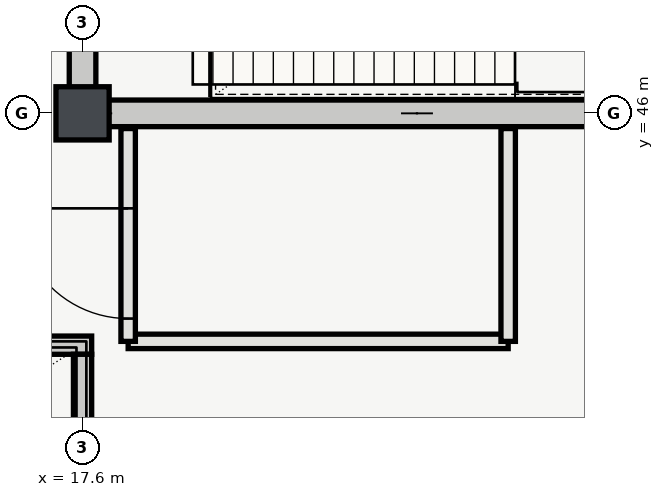
"""IFC4 building model, lengths in metres.
Left out: names, types, materials, properties, quantities, classifications, styles, units other than length and angle.
Written with IfcOpenShell. Run it as: python <this file> out.ifc"""

import sys

from ifc_helpers import new_model, si_unit, direction, frame, frame_2d, origin, origin_2d, place, context, subcontext, project, spatial, rectangle, extrude, element, fill, save


model = new_model("IFC4")
c1 = context("Model", 3, precision=1e-05, world=origin(), true_north=direction((0.0, 1.0)))
c2 = subcontext(c1, "Body", "Model", "MODEL_VIEW")
j1 = project(units=[si_unit("LENGTHUNIT", "METRE"), si_unit("PLANEANGLEUNIT", "RADIAN")], contexts=[c1])
p1 = place(None, origin())
s1 = spatial("IfcSite", under=j1, at=p1, CompositionType="ELEMENT")
p2 = place(p1, origin())
s2 = spatial("IfcBuilding", under=s1, at=p2, CompositionType="ELEMENT")
p3 = place(p2, frame((0.0, 0.0, 10.8)))
s3 = spatial("IfcBuildingStorey", under=s2, at=p3, CompositionType="ELEMENT", Elevation=10.8)
p4 = place(p3, frame((17.6, 46.0, 0.0), z_axis=(0.0, 0.0, 1.0), x_axis=(1.0, 0.0, 0.0)))
e1 = element("IfcColumn", 1, at=p4, inside=s3, PredefinedType="COLUMN", context=c2, shape_type="SweptSolid", body=[
    extrude(rectangle(XDim=0.7, YDim=0.7, at=origin_2d()), origin(), (0.0, 0.0, 1.0), 5.4),
])
p5 = place(p3, frame((17.425, 46.0, 0.0), z_axis=(0.0, 0.0, 1.0), x_axis=(1.0, 0.0, 0.0)))
e2 = element("IfcWall", 2, at=p5, inside=s3, PredefinedType="SHEAR", context=c2, shape_type="SweptSolid", body=[
    extrude(rectangle(XDim=9.15, YDim=0.35, at=frame_2d((4.575, 0.0))), origin(), (0.0, 0.0, 1.0), 5.12),
])
p6 = place(p3, frame((17.6, 46.175, 0.0), z_axis=(0.0, 0.0, 1.0), x_axis=(0.0, 1.0, 0.0)))
e3 = element("IfcWall", 3, at=p6, inside=s3, PredefinedType="SHEAR", context=c2, shape_type="SweptSolid", body=[
    extrude(rectangle(XDim=7.65, YDim=0.35, at=frame_2d((3.825, 0.0))), origin(), (0.0, 0.0, 1.0), 5.12),
])
p7 = place(p6, frame((1.65, 0.0, 0.0)))
e4 = element("IfcOpeningElement", 4, at=p7, cuts=e3, PredefinedType="OPENING", context=c2, shape_type="SweptSolid", body=[
    extrude(rectangle(XDim=1.35, YDim=2.2, at=frame_2d((0.675, 1.1))), frame((0.0, 0.185, 0.0), z_axis=(0.0, -1.0, 0.0), x_axis=(1.0, 0.0, 0.0)), (0.0, 0.0, 1.0), 0.37),
])
p8 = place(p3, frame((18.2, 43.0, 0.0), z_axis=(0.0, 0.0, 1.0), x_axis=(1.0, 0.0, 0.0)))
e5 = element("IfcWall", 5, at=p8, inside=s3, PredefinedType="PARTITIONING", context=c2, shape_type="SweptSolid", body=[
    extrude(rectangle(XDim=5.0, YDim=0.19, at=frame_2d((2.5, 0.0))), origin(), (0.0, 0.0, 1.0), 5.12),
])
p9 = place(p3, frame((18.2, 45.8, 0.0), z_axis=(0.0, 0.0, 1.0), x_axis=(0.0, -1.0, 0.0)))
e6 = element("IfcWall", 6, at=p9, inside=s3, PredefinedType="PARTITIONING", context=c2, shape_type="SweptSolid", body=[
    extrude(rectangle(XDim=2.8, YDim=0.19, at=frame_2d((1.4, 0.0))), origin(), (0.0, 0.0, 1.0), 5.12),
])
p10 = place(p9, frame((1.05, 0.0, 0.0)))
e7 = element("IfcOpeningElement", 7, at=p10, cuts=e6, PredefinedType="OPENING", context=c2, shape_type="SweptSolid", body=[
    extrude(rectangle(XDim=1.45, YDim=2.2, at=frame_2d((0.725, 1.1))), frame((0.0, 0.105, 0.0), z_axis=(0.0, -1.0, 0.0), x_axis=(1.0, 0.0, 0.0)), (0.0, 0.0, 1.0), 0.21),
])
p11 = place(p3, frame((23.2, 43.0, 0.0), z_axis=(0.0, 0.0, 1.0), x_axis=(0.0, 1.0, 0.0)))
e8 = element("IfcWall", 8, at=p11, inside=s3, PredefinedType="PARTITIONING", context=c2, shape_type="SweptSolid", body=[
    extrude(rectangle(XDim=2.8, YDim=0.19, at=frame_2d((1.4, 0.0))), origin(), (0.0, 0.0, 1.0), 5.12),
])
p12 = place(p3, frame((17.72, 42.95, 0.0), z_axis=(0.0, 0.0, 1.0), x_axis=(-1.0, 0.0, 0.0)))
e9 = element("IfcWall", 9, at=p12, inside=s3, PredefinedType="SHEAR", context=c2, shape_type="SweptSolid", body=[
    extrude(rectangle(XDim=9.04, YDim=0.24, at=frame_2d((4.52, 0.0))), origin(), (0.0, 0.0, 1.0), 5.12),
])
p13 = place(p3, frame((17.6, 38.67, 0.0), z_axis=(0.0, 0.0, 1.0), x_axis=(0.0, 1.0, 0.0)))
e10 = element("IfcWall", 10, at=p13, inside=s3, PredefinedType="SHEAR", context=c2, shape_type="SweptSolid", body=[
    extrude(rectangle(XDim=4.16, YDim=0.24, at=frame_2d((2.08, 0.0))), origin(), (0.0, 0.0, 1.0), 5.12),
])
p14 = place(p10, origin())
e11 = element("IfcDoor", 11, at=p14, inside=s3, OperationType="SINGLE_SWING_LEFT", PredefinedType="DOOR", context=c2, shape_type="SweptSolid", body=[
    extrude(rectangle(XDim=1.45, YDim=2.2, at=frame_2d((0.725, 1.1))), frame((0.0, 0.025, 0.0), z_axis=(0.0, -1.0, 0.0), x_axis=(1.0, 0.0, 0.0)), (0.0, 0.0, 1.0), 0.05),
])
fill(e7, e11)
save(model, sys.argv[1])
